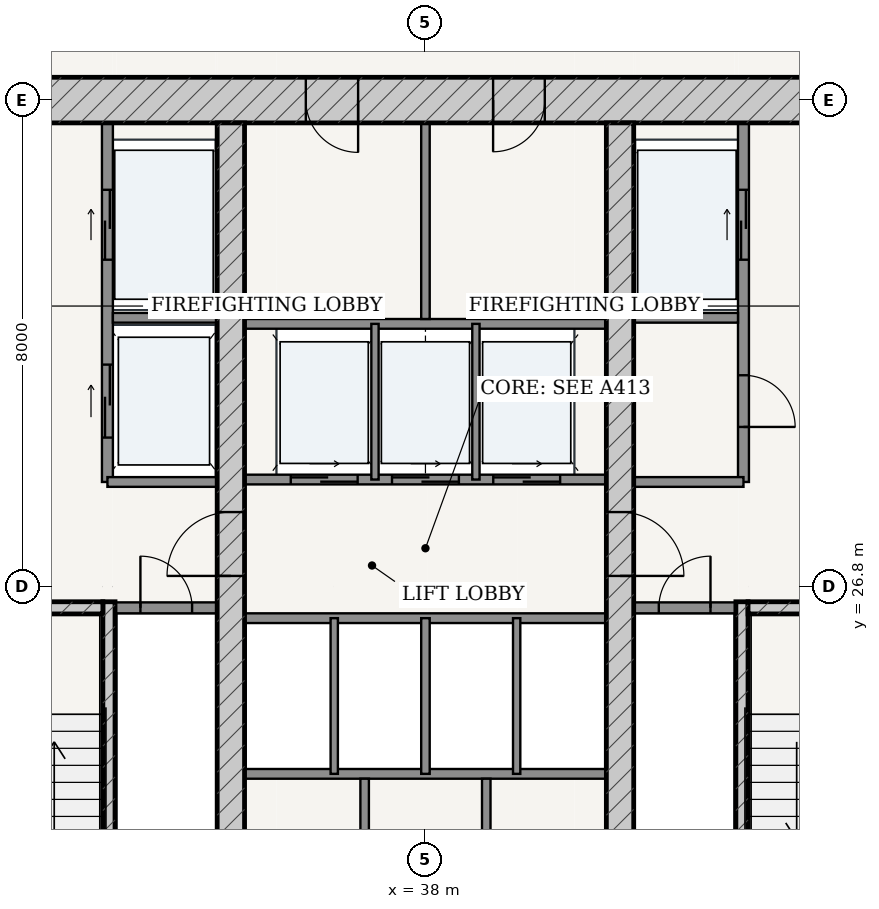
"""IFC4 building model, lengths in metres.
Left out: names, types, materials, properties, quantities, classifications, styles, units other than length and angle.
Written with IfcOpenShell. Run it as: python <this file> out.ifc"""

import sys

from ifc_helpers import new_model, si_unit, direction, frame, frame_2d, origin, place, context, subcontext, project, spatial, rectangle, extrude, source, transform, mapped, element, fill, save


model = new_model("IFC4")
c1 = context("Model", 3, precision=1e-05, world=origin(), true_north=direction((-0.2419218956, 0.970295726276)))
c2 = subcontext(c1, "Body", "Model", "MODEL_VIEW")
j1 = project(units=[si_unit("LENGTHUNIT", "METRE"), si_unit("PLANEANGLEUNIT", "RADIAN")], contexts=[c1])
p1 = place(None, origin())
s1 = spatial("IfcSite", under=j1, at=p1, CompositionType="ELEMENT")
p2 = place(p1, origin())
s2 = spatial("IfcBuilding", under=s1, at=p2, CompositionType="ELEMENT")
p3 = place(p2, frame((0.0, 0.0, 70.8)))
s3 = spatial("IfcBuildingStorey", under=s2, at=p3, CompositionType="ELEMENT", Elevation=70.8)
p4 = place(p3, frame((28.625, 34.8, 0.0), z_axis=(0.0, 0.0, 1.0), x_axis=(1.0, 0.0, 0.0)))
e1 = element("IfcWall", 1, at=p4, inside=s3, PredefinedType="SHEAR", context=c2, shape_type="SweptSolid", body=[
    extrude(rectangle(XDim=18.75, YDim=0.75, at=frame_2d((9.375, 0.0))), origin(), (0.0, 0.0, 1.0), 3.15),
])
p5 = place(p4, frame((7.407, 0.0, 0.0)))
e2 = element("IfcOpeningElement", 2, at=p5, cuts=e1, PredefinedType="OPENING", context=c2, shape_type="SweptSolid", body=[
    extrude(rectangle(XDim=0.86, YDim=2.1, at=frame_2d((0.43, 1.05))), frame((0.0, 0.385, 0.0), z_axis=(0.0, -1.0, 0.0), x_axis=(1.0, 0.0, 0.0)), (0.0, 0.0, 1.0), 0.77),
])
p6 = place(p4, frame((10.488, 0.0, 0.0)))
e3 = element("IfcOpeningElement", 3, at=p6, cuts=e1, PredefinedType="OPENING", context=c2, shape_type="SweptSolid", body=[
    extrude(rectangle(XDim=0.85, YDim=2.1, at=frame_2d((0.425, 1.05))), frame((0.0, 0.385, 0.0), z_axis=(0.0, -1.0, 0.0), x_axis=(1.0, 0.0, 0.0)), (0.0, 0.0, 1.0), 0.77),
])
p7 = place(p3, frame((32.795, 19.175, 0.0), z_axis=(0.0, 0.0, 1.0), x_axis=(0.0, 1.0, 0.0)))
e4 = element("IfcWall", 4, at=p7, inside=s3, PredefinedType="SOLIDWALL", context=c2, shape_type="SweptSolid", body=[
    extrude(rectangle(XDim=7.375, YDim=0.2, at=frame_2d((3.688, 0.0))), origin(), (0.0, 0.0, 1.0), 3.15),
])
p8 = place(p3, frame((29.375, 26.45, 0.0), z_axis=(0.0, 0.0, 1.0), x_axis=(1.0, 0.0, 0.0)))
e5 = element("IfcWall", 5, at=p8, inside=s3, PredefinedType="SOLIDWALL", context=c2, shape_type="SweptSolid", body=[
    extrude(rectangle(XDim=3.32, YDim=0.2, at=frame_2d((1.66, 0.0))), origin(), (0.0, 0.0, 1.0), 3.15),
])
p9 = place(p8, frame((1.185, 0.0, 0.0)))
e6 = element("IfcOpeningElement", 6, at=p9, cuts=e5, PredefinedType="OPENING", context=c2, shape_type="SweptSolid", body=[
    extrude(rectangle(XDim=0.95, YDim=2.15, at=frame_2d((0.475, 1.075))), frame((0.0, 0.11, 0.0), z_axis=(0.0, -1.0, 0.0), x_axis=(1.0, 0.0, 0.0)), (0.0, 0.0, 1.0), 0.22),
])
p10 = place(p3, frame((43.205, 19.175, 0.0), z_axis=(0.0, 0.0, 1.0), x_axis=(0.0, 1.0, 0.0)))
e7 = element("IfcWall", 7, at=p10, inside=s3, PredefinedType="SOLIDWALL", context=c2, shape_type="SweptSolid", body=[
    extrude(rectangle(XDim=7.375, YDim=0.2, at=frame_2d((3.688, 0.0))), origin(), (0.0, 0.0, 1.0), 3.15),
])
p11 = place(p3, frame((43.305, 26.45, 0.0), z_axis=(0.0, 0.0, 1.0), x_axis=(1.0, 0.0, 0.0)))
e8 = element("IfcWall", 8, at=p11, inside=s3, PredefinedType="SOLIDWALL", context=c2, shape_type="SweptSolid", body=[
    extrude(rectangle(XDim=3.32, YDim=0.2, at=frame_2d((1.66, 0.0))), origin(), (0.0, 0.0, 1.0), 3.15),
])
p12 = place(p11, frame((1.185, 0.0, 0.0)))
e9 = element("IfcOpeningElement", 9, at=p12, cuts=e8, PredefinedType="OPENING", context=c2, shape_type="SweptSolid", body=[
    extrude(rectangle(XDim=0.95, YDim=2.15, at=frame_2d((0.475, 1.075))), frame((0.0, 0.11, 0.0), z_axis=(0.0, -1.0, 0.0), x_axis=(1.0, 0.0, 0.0)), (0.0, 0.0, 1.0), 0.22),
])
p13 = place(p3, frame((34.8, 19.175, 0.0), z_axis=(0.0, 0.0, 1.0), x_axis=(0.0, 1.0, 0.0)))
e10 = element("IfcWall", 10, at=p13, inside=s3, PredefinedType="SHEAR", context=c2, shape_type="SweptSolid", body=[
    extrude(rectangle(XDim=15.25, YDim=0.45, at=frame_2d((7.625, 0.0))), origin(), (0.0, 0.0, 1.0), 3.15),
])
p14 = place(p13, frame((7.8, 0.0, 0.0)))
e11 = element("IfcOpeningElement", 11, at=p14, cuts=e10, PredefinedType="OPENING", context=c2, shape_type="SweptSolid", body=[
    extrude(rectangle(XDim=1.05, YDim=2.15, at=frame_2d((0.525, 1.075))), frame((0.0, 0.235, 0.0), z_axis=(0.0, -1.0, 0.0), x_axis=(1.0, 0.0, 0.0)), (0.0, 0.0, 1.0), 0.47),
])
p15 = place(p3, frame((41.2, 19.175, 0.0), z_axis=(0.0, 0.0, 1.0), x_axis=(0.0, 1.0, 0.0)))
e12 = element("IfcWall", 12, at=p15, inside=s3, PredefinedType="SHEAR", context=c2, shape_type="SweptSolid", body=[
    extrude(rectangle(XDim=15.25, YDim=0.45, at=frame_2d((7.625, 0.0))), origin(), (0.0, 0.0, 1.0), 3.15),
])
p16 = place(p15, frame((7.8, 0.0, 0.0)))
e13 = element("IfcOpeningElement", 13, at=p16, cuts=e12, PredefinedType="OPENING", context=c2, shape_type="SweptSolid", body=[
    extrude(rectangle(XDim=1.05, YDim=2.15, at=frame_2d((0.525, 1.075))), frame((0.0, 0.235, 0.0), z_axis=(0.0, -1.0, 0.0), x_axis=(1.0, 0.0, 0.0)), (0.0, 0.0, 1.0), 0.47),
])
p17 = place(p3, frame((32.9, 26.45, 0.0), z_axis=(0.0, 0.0, 1.0), x_axis=(1.0, 0.0, 0.0)))
e14 = element("IfcWall", 14, at=p17, inside=s3, PredefinedType="PARTITIONING", context=c2, shape_type="SweptSolid", body=[
    extrude(rectangle(XDim=1.675, YDim=0.18, at=frame_2d((0.837, 0.0))), origin(), (0.0, 0.0, 1.0), 3.15),
])
p18 = place(p17, frame((0.413, 0.0, 0.0)))
e15 = element("IfcOpeningElement", 15, at=p18, cuts=e14, PredefinedType="OPENING", context=c2, shape_type="SweptSolid", body=[
    extrude(rectangle(XDim=0.85, YDim=2.1, at=frame_2d((0.425, 1.05))), frame((0.0, 0.1, 0.0), z_axis=(0.0, -1.0, 0.0), x_axis=(1.0, 0.0, 0.0)), (0.0, 0.0, 1.0), 0.2),
])
p19 = place(p3, frame((41.425, 26.45, 0.0), z_axis=(0.0, 0.0, 1.0), x_axis=(1.0, 0.0, 0.0)))
e16 = element("IfcWall", 16, at=p19, inside=s3, PredefinedType="PARTITIONING", context=c2, shape_type="SweptSolid", body=[
    extrude(rectangle(XDim=1.675, YDim=0.18, at=frame_2d((0.837, 0.0))), origin(), (0.0, 0.0, 1.0), 3.15),
])
p20 = place(p19, frame((0.413, 0.0, 0.0)))
e17 = element("IfcOpeningElement", 17, at=p20, cuts=e16, PredefinedType="OPENING", context=c2, shape_type="SweptSolid", body=[
    extrude(rectangle(XDim=0.85, YDim=2.1, at=frame_2d((0.425, 1.05))), frame((0.0, 0.1, 0.0), z_axis=(0.0, -1.0, 0.0), x_axis=(1.0, 0.0, 0.0)), (0.0, 0.0, 1.0), 0.2),
])
p21 = place(p3, frame((32.77, 28.52, 0.0), z_axis=(0.0, 0.0, 1.0), x_axis=(0.0, 1.0, 0.0)))
e18 = element("IfcWall", 18, at=p21, inside=s3, PredefinedType="PARTITIONING", context=c2, shape_type="SweptSolid", body=[
    extrude(rectangle(XDim=5.905, YDim=0.18, at=frame_2d((2.953, 0.0))), origin(), (0.0, 0.0, 1.0), 3.15),
])
p22 = place(p21, frame((3.655, 0.0, 0.0)))
e19 = element("IfcOpeningElement", 19, at=p22, cuts=e18, PredefinedType="OPENING", context=c2, shape_type="SweptSolid", body=[
    extrude(rectangle(XDim=1.15, YDim=2.2, at=frame_2d((0.575, 1.1))), frame((0.0, 0.1, 0.0), z_axis=(0.0, -1.0, 0.0), x_axis=(1.0, 0.0, 0.0)), (0.0, 0.0, 1.0), 0.2),
])
p23 = place(p21, frame((0.73, 0.0, 0.0)))
e20 = element("IfcOpeningElement", 20, at=p23, cuts=e18, PredefinedType="OPENING", context=c2, shape_type="SweptSolid", body=[
    extrude(rectangle(XDim=1.2, YDim=2.25, at=frame_2d((0.6, 1.125))), frame((0.0, 0.1, 0.0), z_axis=(0.0, -1.0, 0.0), x_axis=(1.0, 0.0, 0.0)), (0.0, 0.0, 1.0), 0.2),
])
p24 = place(p3, frame((32.86, 31.22, 0.0), z_axis=(0.0, 0.0, 1.0), x_axis=(1.0, 0.0, 0.0)))
e21 = element("IfcWall", 21, at=p24, inside=s3, PredefinedType="PARTITIONING", context=c2, shape_type="SweptSolid", body=[
    extrude(rectangle(XDim=1.715, YDim=0.16, at=frame_2d((0.857, 0.0))), origin(), (0.0, 0.0, 1.0), 3.15),
])
p25 = place(p3, frame((32.77, 28.52, 0.0), z_axis=(0.0, 0.0, 1.0), x_axis=(1.0, 0.0, 0.0)))
e22 = element("IfcWall", 22, at=p25, inside=s3, PredefinedType="PARTITIONING", context=c2, shape_type="SweptSolid", body=[
    extrude(rectangle(XDim=1.805, YDim=0.16, at=frame_2d((0.902, 0.0))), origin(), (0.0, 0.0, 1.0), 3.15),
])
p26 = place(p3, frame((43.23, 28.52, 0.0), z_axis=(0.0, 0.0, 1.0), x_axis=(0.0, 1.0, 0.0)))
e23 = element("IfcWall", 23, at=p26, inside=s3, PredefinedType="PARTITIONING", context=c2, shape_type="SweptSolid", body=[
    extrude(rectangle(XDim=5.905, YDim=0.18, at=frame_2d((2.953, 0.0))), origin(), (0.0, 0.0, 1.0), 3.15),
])
p27 = place(p26, frame((0.905, 0.0, 0.0)))
e24 = element("IfcOpeningElement", 24, at=p27, cuts=e23, PredefinedType="OPENING", context=c2, shape_type="SweptSolid", body=[
    extrude(rectangle(XDim=0.85, YDim=2.1, at=frame_2d((0.425, 1.05))), frame((0.0, 0.1, 0.0), z_axis=(0.0, -1.0, 0.0), x_axis=(1.0, 0.0, 0.0)), (0.0, 0.0, 1.0), 0.2),
])
p28 = place(p26, frame((3.655, 0.0, 0.0)))
e25 = element("IfcOpeningElement", 25, at=p28, cuts=e23, PredefinedType="OPENING", context=c2, shape_type="SweptSolid", body=[
    extrude(rectangle(XDim=1.15, YDim=2.2, at=frame_2d((0.575, 1.1))), frame((0.0, 0.1, 0.0), z_axis=(0.0, -1.0, 0.0), x_axis=(1.0, 0.0, 0.0)), (0.0, 0.0, 1.0), 0.2),
])
p29 = place(p3, frame((41.425, 31.22, 0.0), z_axis=(0.0, 0.0, 1.0), x_axis=(1.0, 0.0, 0.0)))
e26 = element("IfcWall", 26, at=p29, inside=s3, PredefinedType="PARTITIONING", context=c2, shape_type="SweptSolid", body=[
    extrude(rectangle(XDim=1.715, YDim=0.16, at=frame_2d((0.857, 0.0))), origin(), (0.0, 0.0, 1.0), 3.15),
])
p30 = place(p3, frame((41.425, 28.52, 0.0), z_axis=(0.0, 0.0, 1.0), x_axis=(1.0, 0.0, 0.0)))
e27 = element("IfcWall", 27, at=p30, inside=s3, PredefinedType="PARTITIONING", context=c2, shape_type="SweptSolid", body=[
    extrude(rectangle(XDim=1.805, YDim=0.16, at=frame_2d((0.902, 0.0))), origin(), (0.0, 0.0, 1.0), 3.15),
])
p31 = place(p3, frame((35.025, 28.56, 0.0), z_axis=(0.0, 0.0, 1.0), x_axis=(1.0, 0.0, 0.0)))
e28 = element("IfcWall", 28, at=p31, inside=s3, PredefinedType="PARTITIONING", context=c2, shape_type="SweptSolid", body=[
    extrude(rectangle(XDim=5.95, YDim=0.16, at=frame_2d((2.975, 0.0))), origin(), (0.0, 0.0, 1.0), 3.15),
])
p32 = place(p31, frame((0.76, 0.0, 0.0)))
e29 = element("IfcOpeningElement", 29, at=p32, cuts=e28, PredefinedType="OPENING", context=c2, shape_type="SweptSolid", body=[
    extrude(rectangle(XDim=1.1, YDim=2.2, at=frame_2d((0.55, 1.1))), frame((0.0, 0.09, 0.0), z_axis=(0.0, -1.0, 0.0), x_axis=(1.0, 0.0, 0.0)), (0.0, 0.0, 1.0), 0.18),
])
p33 = place(p31, frame((2.425, 0.0, 0.0)))
e30 = element("IfcOpeningElement", 30, at=p33, cuts=e28, PredefinedType="OPENING", context=c2, shape_type="SweptSolid", body=[
    extrude(rectangle(XDim=1.1, YDim=2.2, at=frame_2d((0.55, 1.1))), frame((0.0, 0.09, 0.0), z_axis=(0.0, -1.0, 0.0), x_axis=(1.0, 0.0, 0.0)), (0.0, 0.0, 1.0), 0.18),
])
p34 = place(p31, frame((4.09, 0.0, 0.0)))
e31 = element("IfcOpeningElement", 31, at=p34, cuts=e28, PredefinedType="OPENING", context=c2, shape_type="SweptSolid", body=[
    extrude(rectangle(XDim=1.1, YDim=2.2, at=frame_2d((0.55, 1.1))), frame((0.0, 0.09, 0.0), z_axis=(0.0, -1.0, 0.0), x_axis=(1.0, 0.0, 0.0)), (0.0, 0.0, 1.0), 0.18),
])
p35 = place(p3, frame((35.025, 31.12, 0.0), z_axis=(0.0, 0.0, 1.0), x_axis=(1.0, 0.0, 0.0)))
e32 = element("IfcWall", 32, at=p35, inside=s3, PredefinedType="PARTITIONING", context=c2, shape_type="SweptSolid", body=[
    extrude(rectangle(XDim=5.95, YDim=0.16, at=frame_2d((2.975, 0.0))), origin(), (0.0, 0.0, 1.0), 3.15),
])
for number, where, z_axis, x_axis in (
    (33, (37.17, 28.56, 0.0), (0.0, 0.0, 1.0), (0.0, 1.0, 0.0)),
    (34, (38.83, 28.56, 0.0), (0.0, 0.0, 1.0), (0.0, 1.0, 0.0)),
):
    element("IfcWall", number, at=place(p3, frame(where, z_axis=z_axis, x_axis=x_axis)), inside=s3, PredefinedType="PARTITIONING", context=c2, shape_type="SweptSolid", body=[
        extrude(rectangle(XDim=2.56, YDim=0.12, at=frame_2d((1.28, 0.0))), origin(), (0.0, 0.0, 1.0), 3.15),
    ])
p36 = place(p3, frame((38.0, 31.2, 0.0), z_axis=(0.0, 0.0, 1.0), x_axis=(0.0, 1.0, 0.0)))
e35 = element("IfcWall", 35, at=p36, inside=s3, PredefinedType="PARTITIONING", context=c2, shape_type="SweptSolid", body=[
    extrude(rectangle(XDim=3.225, YDim=0.14, at=frame_2d((1.613, 0.0))), origin(), (0.0, 0.0, 1.0), 3.15),
])
for number, where, z_axis, x_axis in (
    (36, (35.025, 26.28, 0.0), (0.0, 0.0, 1.0), (1.0, 0.0, 0.0)),
    (37, (35.025, 23.72, 0.0), (0.0, 0.0, 1.0), (1.0, 0.0, 0.0)),
):
    element("IfcWall", number, at=place(p3, frame(where, z_axis=z_axis, x_axis=x_axis)), inside=s3, PredefinedType="PARTITIONING", context=c2, shape_type="SweptSolid", body=[
        extrude(rectangle(XDim=5.95, YDim=0.16, at=frame_2d((2.975, 0.0))), origin(), (0.0, 0.0, 1.0), 3.15),
    ])
p37 = place(p3, frame((36.5, 23.72, 0.0), z_axis=(0.0, 0.0, 1.0), x_axis=(0.0, 1.0, 0.0)))
e38 = element("IfcWall", 38, at=p37, inside=s3, PredefinedType="PARTITIONING", context=c2, shape_type="SweptSolid", body=[
    extrude(rectangle(XDim=2.56, YDim=0.12, at=frame_2d((1.28, 0.0))), origin(), (0.0, 0.0, 1.0), 3.15),
])
p38 = place(p3, frame((38.0, 23.72, 0.0), z_axis=(0.0, 0.0, 1.0), x_axis=(0.0, 1.0, 0.0)))
e39 = element("IfcWall", 39, at=p38, inside=s3, PredefinedType="PARTITIONING", context=c2, shape_type="SweptSolid", body=[
    extrude(rectangle(XDim=2.56, YDim=0.14, at=frame_2d((1.28, 0.0))), origin(), (0.0, 0.0, 1.0), 3.15),
])
p39 = place(p3, frame((39.5, 23.72, 0.0), z_axis=(0.0, 0.0, 1.0), x_axis=(0.0, 1.0, 0.0)))
e40 = element("IfcWall", 40, at=p39, inside=s3, PredefinedType="PARTITIONING", context=c2, shape_type="SweptSolid", body=[
    extrude(rectangle(XDim=2.56, YDim=0.12, at=frame_2d((1.28, 0.0))), origin(), (0.0, 0.0, 1.0), 3.15),
])
p40 = place(p3, frame((37.0, 19.175, 0.0), z_axis=(0.0, 0.0, 1.0), x_axis=(0.0, 1.0, 0.0)))
e41 = element("IfcWall", 41, at=p40, inside=s3, PredefinedType="PARTITIONING", context=c2, shape_type="SweptSolid", body=[
    extrude(rectangle(XDim=4.465, YDim=0.14, at=frame_2d((2.232, 0.0))), origin(), (0.0, 0.0, 1.0), 3.15),
])
p41 = place(p40, frame((1.808, 0.0, 0.0)))
e42 = element("IfcOpeningElement", 42, at=p41, cuts=e41, PredefinedType="OPENING", context=c2, shape_type="SweptSolid", body=[
    extrude(rectangle(XDim=0.85, YDim=2.1, at=frame_2d((0.425, 1.05))), frame((0.0, 0.08, 0.0), z_axis=(0.0, -1.0, 0.0), x_axis=(1.0, 0.0, 0.0)), (0.0, 0.0, 1.0), 0.16),
])
p42 = place(p3, frame((39.0, 19.175, 0.0), z_axis=(0.0, 0.0, 1.0), x_axis=(0.0, 1.0, 0.0)))
e43 = element("IfcWall", 43, at=p42, inside=s3, PredefinedType="PARTITIONING", context=c2, shape_type="SweptSolid", body=[
    extrude(rectangle(XDim=4.465, YDim=0.14, at=frame_2d((2.232, 0.0))), origin(), (0.0, 0.0, 1.0), 3.15),
])
p43 = place(p42, frame((1.808, 0.0, 0.0)))
e44 = element("IfcOpeningElement", 44, at=p43, cuts=e43, PredefinedType="OPENING", context=c2, shape_type="SweptSolid", body=[
    extrude(rectangle(XDim=0.85, YDim=2.1, at=frame_2d((0.425, 1.05))), frame((0.0, 0.08, 0.0), z_axis=(0.0, -1.0, 0.0), x_axis=(1.0, 0.0, 0.0)), (0.0, 0.0, 1.0), 0.16),
])
m1 = source(origin(), c2, "Body", "SweptSolid", [
    extrude(rectangle(XDim=1.05, YDim=2.15, at=frame_2d((0.525, 1.075))), frame((0.0, 0.025, 0.0), z_axis=(0.0, -1.0, 0.0), x_axis=(1.0, 0.0, 0.0)), (0.0, 0.0, 1.0), 0.05),
])
p44 = place(p14, origin())
e45 = element("IfcDoor", 45, at=p44, inside=s3, OperationType="SINGLE_SWING_LEFT", PredefinedType="DOOR", context=c2, shape_type="MappedRepresentation", body=[
    mapped(m1, transform((0.0, 0.0, 0.0), scale=1.0)),
])
fill(e11, e45)
p45 = place(p16, frame((1.05, 0.0, 0.0), z_axis=(0.0, 0.0, 1.0), x_axis=(-1.0, 0.0, 0.0)))
e46 = element("IfcDoor", 46, at=p45, inside=s3, OperationType="SINGLE_SWING_RIGHT", PredefinedType="DOOR", context=c2, shape_type="MappedRepresentation", body=[
    mapped(m1, transform((0.0, 0.0, 0.0), scale=1.0)),
])
fill(e13, e46)
m2 = source(origin(), c2, "Body", "SweptSolid", [
    extrude(rectangle(XDim=0.85, YDim=2.1, at=frame_2d((0.425, 1.05))), frame((0.0, 0.025, 0.0), z_axis=(0.0, -1.0, 0.0), x_axis=(1.0, 0.0, 0.0)), (0.0, 0.0, 1.0), 0.05),
])
p46 = place(p18, origin())
e47 = element("IfcDoor", 47, at=p46, inside=s3, OperationType="SINGLE_SWING_LEFT", PredefinedType="DOOR", context=c2, shape_type="MappedRepresentation", body=[
    mapped(m2, transform((0.0, 0.0, 0.0), scale=1.0)),
])
fill(e15, e47)
p47 = place(p20, origin())
e48 = element("IfcDoor", 48, at=p47, inside=s3, OperationType="SINGLE_SWING_RIGHT", PredefinedType="DOOR", context=c2, shape_type="MappedRepresentation", body=[
    mapped(m2, transform((0.0, 0.0, 0.0), scale=1.0)),
])
fill(e17, e48)
p48 = place(p27, frame((0.85, 0.0, 0.0), z_axis=(0.0, 0.0, 1.0), x_axis=(-1.0, 0.0, 0.0)))
e49 = element("IfcDoor", 49, at=p48, inside=s3, OperationType="SINGLE_SWING_RIGHT", PredefinedType="DOOR", context=c2, shape_type="MappedRepresentation", body=[
    mapped(m2, transform((0.0, 0.0, 0.0), scale=1.0)),
])
fill(e24, e49)
m3 = source(origin(), c2, "Body", "SweptSolid", [
    extrude(rectangle(XDim=0.86, YDim=2.1, at=frame_2d((0.43, 1.05))), frame((0.0, 0.025, 0.0), z_axis=(0.0, -1.0, 0.0), x_axis=(1.0, 0.0, 0.0)), (0.0, 0.0, 1.0), 0.05),
])
p49 = place(p5, frame((0.86, 0.0, 0.0), z_axis=(0.0, 0.0, 1.0), x_axis=(-1.0, 0.0, 0.0)))
e50 = element("IfcDoor", 50, at=p49, inside=s3, OperationType="SINGLE_SWING_LEFT", PredefinedType="DOOR", context=c2, shape_type="MappedRepresentation", body=[
    mapped(m3, transform((0.0, 0.0, 0.0), scale=1.0)),
])
fill(e2, e50)
p50 = place(p6, frame((0.85, 0.0, 0.0), z_axis=(0.0, 0.0, 1.0), x_axis=(-1.0, 0.0, 0.0)))
e51 = element("IfcDoor", 51, at=p50, inside=s3, OperationType="SINGLE_SWING_RIGHT", PredefinedType="DOOR", context=c2, shape_type="MappedRepresentation", body=[
    mapped(m2, transform((0.0, 0.0, 0.0), scale=1.0)),
])
fill(e3, e51)
m4 = source(origin(), c2, "Body", "SweptSolid", [
    extrude(rectangle(XDim=1.15, YDim=2.2, at=frame_2d((0.575, 1.1))), frame((0.0, 0.025, 0.0), z_axis=(0.0, -1.0, 0.0), x_axis=(1.0, 0.0, 0.0)), (0.0, 0.0, 1.0), 0.05),
])
p51 = place(p22, origin())
e52 = element("IfcDoor", 52, at=p51, inside=s3, OperationType="DOUBLE_DOOR_SLIDING", PredefinedType="DOOR", context=c2, shape_type="MappedRepresentation", body=[
    mapped(m4, transform((0.0, 0.0, 0.0), scale=1.0)),
])
fill(e19, e52)
p52 = place(p28, origin())
e53 = element("IfcDoor", 53, at=p52, inside=s3, OperationType="DOUBLE_DOOR_SLIDING", PredefinedType="DOOR", context=c2, shape_type="MappedRepresentation", body=[
    mapped(m4, transform((0.0, 0.0, 0.0), scale=1.0)),
])
fill(e25, e53)
m5 = source(origin(), c2, "Body", "SweptSolid", [
    extrude(rectangle(XDim=1.2, YDim=2.25, at=frame_2d((0.6, 1.125))), frame((0.0, 0.025, 0.0), z_axis=(0.0, -1.0, 0.0), x_axis=(1.0, 0.0, 0.0)), (0.0, 0.0, 1.0), 0.05),
])
p53 = place(p23, origin())
e54 = element("IfcDoor", 54, at=p53, inside=s3, OperationType="DOUBLE_DOOR_SLIDING", PredefinedType="DOOR", context=c2, shape_type="MappedRepresentation", body=[
    mapped(m5, transform((0.0, 0.0, 0.0), scale=1.0)),
])
fill(e20, e54)
m6 = source(origin(), c2, "Body", "SweptSolid", [
    extrude(rectangle(XDim=1.1, YDim=2.2, at=frame_2d((0.55, 1.1))), frame((0.0, 0.025, 0.0), z_axis=(0.0, -1.0, 0.0), x_axis=(1.0, 0.0, 0.0)), (0.0, 0.0, 1.0), 0.05),
])
p54 = place(p32, origin())
e55 = element("IfcDoor", 55, at=p54, inside=s3, OperationType="DOUBLE_DOOR_SLIDING", PredefinedType="DOOR", context=c2, shape_type="MappedRepresentation", body=[
    mapped(m6, transform((0.0, 0.0, 0.0), scale=1.0)),
])
fill(e29, e55)
p55 = place(p33, origin())
e56 = element("IfcDoor", 56, at=p55, inside=s3, OperationType="DOUBLE_DOOR_SLIDING", PredefinedType="DOOR", context=c2, shape_type="MappedRepresentation", body=[
    mapped(m6, transform((0.0, 0.0, 0.0), scale=1.0)),
])
fill(e30, e56)
p56 = place(p34, origin())
e57 = element("IfcDoor", 57, at=p56, inside=s3, OperationType="DOUBLE_DOOR_SLIDING", PredefinedType="DOOR", context=c2, shape_type="MappedRepresentation", body=[
    mapped(m6, transform((0.0, 0.0, 0.0), scale=1.0)),
])
fill(e31, e57)
save(model, sys.argv[1])
